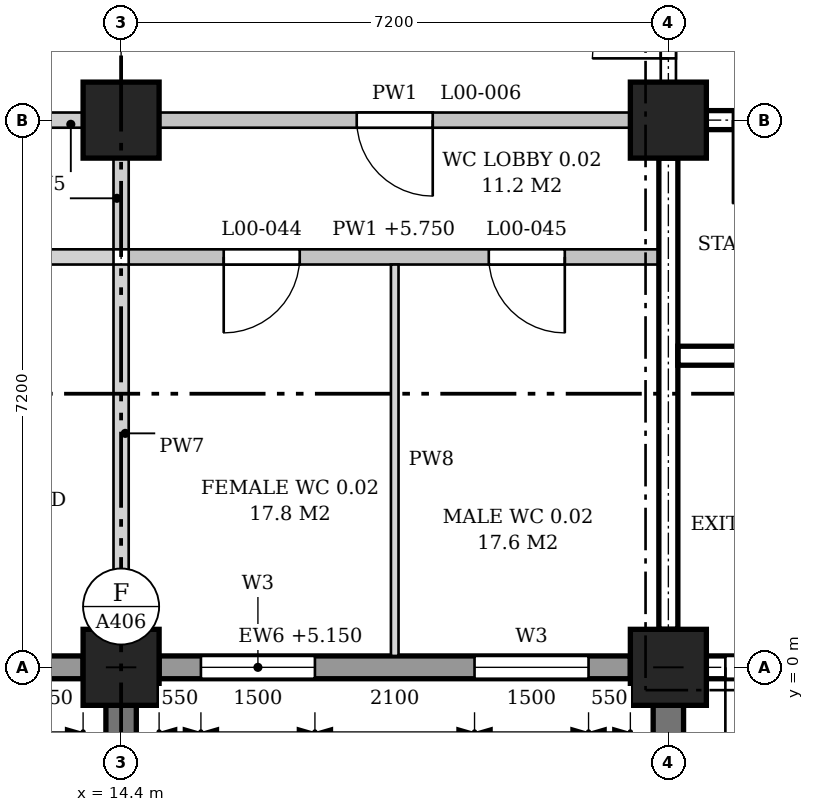
"""IFC4 building model, lengths in metres.
Left out: names, types, materials, properties, quantities, classifications, styles, units other than length and angle.
Written with IfcOpenShell. Run it as: python <this file> out.ifc"""

import sys

from ifc_helpers import new_model, si_unit, direction, frame, frame_2d, origin, origin_2d, place, context, subcontext, project, spatial, polyline, rectangle, outline, extrude, element, fill, save


model = new_model("IFC4")
c1 = context("Model", 3, precision=1e-05, world=origin(), true_north=direction((0.0, 1.0)))
c2 = subcontext(c1, "Body", "Model", "MODEL_VIEW")
j1 = project(units=[si_unit("LENGTHUNIT", "METRE"), si_unit("PLANEANGLEUNIT", "RADIAN")], contexts=[c1])
p1 = place(None, origin())
s1 = spatial("IfcSite", under=j1, at=p1, CompositionType="ELEMENT")
p2 = place(p1, origin())
s2 = spatial("IfcBuilding", under=s1, at=p2, CompositionType="ELEMENT")
p3 = place(p2, origin())
s3 = spatial("IfcBuildingStorey", under=s2, at=p3, CompositionType="ELEMENT", Elevation=0.0)
for number, where, z_axis, x_axis in (
    (1, (14.4, 0.0, 0.0), (0.0, 0.0, 1.0), (1.0, 0.0, 0.0)),
    (2, (14.4, 7.2, 0.0), (0.0, 0.0, 1.0), (1.0, 0.0, 0.0)),
    (3, (21.6, 0.0, 0.0), (0.0, 0.0, 1.0), (1.0, 0.0, 0.0)),
    (4, (21.6, 7.2, 0.0), (0.0, 0.0, 1.0), (1.0, 0.0, 0.0)),
):
    element("IfcColumn", number, at=place(p3, frame(where, z_axis=z_axis, x_axis=x_axis)), inside=s3, PredefinedType="COLUMN", context=c2, shape_type="SweptSolid", body=[
        extrude(rectangle(XDim=1.0, YDim=1.0, at=origin_2d()), origin(), (0.0, 0.0, 1.0), 6.0),
    ])
p4 = place(p3, frame((7.7, 0.0, 0.0), z_axis=(0.0, 0.0, 1.0), x_axis=(1.0, 0.0, 0.0)))
e5 = element("IfcWall", 5, at=p4, inside=s3, PredefinedType="STANDARD", context=c2, shape_type="SweptSolid", body=[
    extrude(rectangle(XDim=6.2, YDim=0.3, at=frame_2d((3.1, 0.0))), origin(), (0.0, 0.0, 1.0), 5.15),
])
p5 = place(p4, frame((4.35, 0.0, 0.0)))
e6 = element("IfcOpeningElement", 6, at=p5, cuts=e5, PredefinedType="OPENING", context=c2, shape_type="SweptSolid", body=[
    extrude(rectangle(XDim=1.1, YDim=2.1, at=frame_2d((0.55, 1.05))), frame((0.0, 0.16, 0.0), z_axis=(0.0, -1.0, 0.0), x_axis=(1.0, 0.0, 0.0)), (0.0, 0.0, 1.0), 0.32),
])
p6 = place(p4, frame((0.55, 0.0, 0.9)))
e7 = element("IfcOpeningElement", 7, at=p6, cuts=e5, PredefinedType="OPENING", context=c2, shape_type="SweptSolid", body=[
    extrude(outline(polyline([(0.0, 0.0), (1.5, 0.0), (1.5, 3.25), (0.75, 4.0), (0.0, 3.25), (0.0, 0.0)])), frame((0.0, 0.16, 0.0), z_axis=(0.0, -1.0, 0.0), x_axis=(1.0, 0.0, 0.0)), (0.0, 0.0, 1.0), 0.32),
])
p7 = place(p3, frame((14.9, 0.0, 0.0), z_axis=(0.0, 0.0, 1.0), x_axis=(1.0, 0.0, 0.0)))
e8 = element("IfcWall", 8, at=p7, inside=s3, PredefinedType="STANDARD", context=c2, shape_type="SweptSolid", body=[
    extrude(rectangle(XDim=6.2, YDim=0.3, at=frame_2d((3.1, 0.0))), origin(), (0.0, 0.0, 1.0), 5.15),
])
p8 = place(p7, frame((0.55, 0.0, 0.9)))
e9 = element("IfcOpeningElement", 9, at=p8, cuts=e8, PredefinedType="OPENING", context=c2, shape_type="SweptSolid", body=[
    extrude(outline(polyline([(0.0, 0.0), (1.5, 0.0), (1.5, 3.25), (0.75, 4.0), (0.0, 3.25), (0.0, 0.0)])), frame((0.0, 0.16, 0.0), z_axis=(0.0, -1.0, 0.0), x_axis=(1.0, 0.0, 0.0)), (0.0, 0.0, 1.0), 0.32),
])
p9 = place(p7, frame((4.15, 0.0, 0.9)))
e10 = element("IfcOpeningElement", 10, at=p9, cuts=e8, PredefinedType="OPENING", context=c2, shape_type="SweptSolid", body=[
    extrude(outline(polyline([(0.0, 0.0), (1.5, 0.0), (1.5, 3.25), (0.75, 4.0), (0.0, 3.25), (0.0, 0.0)])), frame((0.0, 0.16, 0.0), z_axis=(0.0, -1.0, 0.0), x_axis=(1.0, 0.0, 0.0)), (0.0, 0.0, 1.0), 0.32),
])
p10 = place(p3, frame((22.1, 0.0, 0.0), z_axis=(0.0, 0.0, 1.0), x_axis=(1.0, 0.0, 0.0)))
e11 = element("IfcWall", 11, at=p10, inside=s3, PredefinedType="STANDARD", context=c2, shape_type="SweptSolid", body=[
    extrude(rectangle(XDim=6.2, YDim=0.3, at=frame_2d((3.1, 0.0))), origin(), (0.0, 0.0, 1.0), 5.15),
])
p11 = place(p10, frame((0.25, 0.0, 0.0)))
e12 = element("IfcOpeningElement", 12, at=p11, cuts=e11, PredefinedType="OPENING", context=c2, shape_type="SweptSolid", body=[
    extrude(rectangle(XDim=2.0, YDim=2.1, at=frame_2d((1.0, 1.05))), frame((0.0, 0.16, 0.0), z_axis=(0.0, -1.0, 0.0), x_axis=(1.0, 0.0, 0.0)), (0.0, 0.0, 1.0), 0.32),
])
p12 = place(p10, frame((4.45, 0.0, 0.9)))
e13 = element("IfcOpeningElement", 13, at=p12, cuts=e11, PredefinedType="OPENING", context=c2, shape_type="SweptSolid", body=[
    extrude(outline(polyline([(0.0, 0.0), (0.9, 0.0), (0.9, 3.55), (0.45, 4.0), (0.0, 3.55), (0.0, 0.0)])), frame((0.0, 0.16, 0.0), z_axis=(0.0, -1.0, 0.0), x_axis=(1.0, 0.0, 0.0)), (0.0, 0.0, 1.0), 0.32),
])
for number, where, z_axis, x_axis in (
    (14, (14.4, -0.5, 0.0), (0.0, 0.0, 1.0), (0.0, -1.0, 0.0)),
    (15, (21.6, -0.5, 0.0), (0.0, 0.0, 1.0), (0.0, -1.0, 0.0)),
):
    element("IfcWall", number, at=place(p3, frame(where, z_axis=z_axis, x_axis=x_axis)), inside=s3, PredefinedType="POLYGONAL", context=c2, shape_type="SweptSolid", body=[
        extrude(outline(polyline([(1.2, 0.0), (1.2, 20.825), (0.85, 21.35), (0.0, 21.35), (0.0, 0.0), (1.2, 0.0)])), frame((0.0, 0.2, 0.0), z_axis=(0.0, -1.0, 0.0), x_axis=(1.0, 0.0, 0.0)), (0.0, 0.0, 1.0), 0.4),
    ])
p13 = place(p3, frame((22.1, 7.2, 0.0), z_axis=(0.0, 0.0, 1.0), x_axis=(1.0, 0.0, 0.0)))
e16 = element("IfcWall", 16, at=p13, inside=s3, PredefinedType="SHEAR", context=c2, shape_type="SweptSolid", body=[
    extrude(rectangle(XDim=6.2, YDim=0.25, at=frame_2d((3.1, 0.0))), origin(), (0.0, 0.0, 1.0), 5.0),
])
p14 = place(p13, frame((0.35, 0.0, 0.0)))
e17 = element("IfcOpeningElement", 17, at=p14, cuts=e16, PredefinedType="OPENING", context=c2, shape_type="SweptSolid", body=[
    extrude(rectangle(XDim=1.1, YDim=2.1, at=frame_2d((0.55, 1.05))), frame((0.0, 0.135, 0.0), z_axis=(0.0, -1.0, 0.0), x_axis=(1.0, 0.0, 0.0)), (0.0, 0.0, 1.0), 0.27),
])
p15 = place(p3, frame((21.6, 0.5, 0.0), z_axis=(0.0, 0.0, 1.0), x_axis=(0.0, 1.0, 0.0)))
e18 = element("IfcWall", 18, at=p15, inside=s3, PredefinedType="SHEAR", context=c2, shape_type="SweptSolid", body=[
    extrude(rectangle(XDim=6.2, YDim=0.25, at=frame_2d((3.1, 0.0))), origin(), (0.0, 0.0, 1.0), 5.0),
])
p16 = place(p3, frame((21.725, 4.1, 0.0), z_axis=(0.0, 0.0, 1.0), x_axis=(1.0, 0.0, 0.0)))
e19 = element("IfcWall", 19, at=p16, inside=s3, PredefinedType="SHEAR", context=c2, shape_type="SweptSolid", body=[
    extrude(rectangle(XDim=2.975, YDim=0.25, at=frame_2d((1.487, 0.0))), origin(), (0.0, 0.0, 1.0), 5.75),
])
p17 = place(p16, frame((1.425, 0.0, 0.0)))
e20 = element("IfcOpeningElement", 20, at=p17, cuts=e19, PredefinedType="OPENING", context=c2, shape_type="SweptSolid", body=[
    extrude(rectangle(XDim=1.1, YDim=2.1, at=frame_2d((0.55, 1.05))), frame((0.0, 0.135, 0.0), z_axis=(0.0, -1.0, 0.0), x_axis=(1.0, 0.0, 0.0)), (0.0, 0.0, 1.0), 0.27),
])
p18 = place(p3, frame((10.9, 5.4, 0.0), z_axis=(0.0, 0.0, 1.0), x_axis=(1.0, 0.0, 0.0)))
e21 = element("IfcWall", 21, at=p18, inside=s3, PredefinedType="SOLIDWALL", context=c2, shape_type="SweptSolid", body=[
    extrude(outline(polyline([(0.0, 0.0), (3.4, 0.0), (3.4, 5.0), (3.25, 5.0), (3.25, 5.75), (0.0, 5.75), (0.0, 0.0)])), frame((0.0, 0.1, 0.0), z_axis=(0.0, -1.0, 0.0), x_axis=(1.0, 0.0, 0.0)), (0.0, 0.0, 1.0), 0.2),
])
p19 = place(p3, frame((14.5, 5.4, 0.0), z_axis=(0.0, 0.0, 1.0), x_axis=(1.0, 0.0, 0.0)))
e22 = element("IfcWall", 22, at=p19, inside=s3, PredefinedType="PARTITIONING", context=c2, shape_type="SweptSolid", body=[
    extrude(outline(polyline([(0.0, 0.0), (6.975, 0.0), (6.975, 5.0), (6.85, 5.0), (6.85, 5.75), (0.15, 5.75), (0.15, 5.0), (0.0, 5.0), (0.0, 0.0)])), frame((0.0, 0.1, 0.0), z_axis=(0.0, -1.0, 0.0), x_axis=(1.0, 0.0, 0.0)), (0.0, 0.0, 1.0), 0.2),
])
p20 = place(p19, frame((1.25, 0.0, 0.0)))
e23 = element("IfcOpeningElement", 23, at=p20, cuts=e22, PredefinedType="OPENING", context=c2, shape_type="SweptSolid", body=[
    extrude(rectangle(XDim=1.0, YDim=2.1, at=frame_2d((0.5, 1.05))), frame((0.0, 0.11, 0.0), z_axis=(0.0, -1.0, 0.0), x_axis=(1.0, 0.0, 0.0)), (0.0, 0.0, 1.0), 0.22),
])
p21 = place(p19, frame((4.738, 0.0, 0.0)))
e24 = element("IfcOpeningElement", 24, at=p21, cuts=e22, PredefinedType="OPENING", context=c2, shape_type="SweptSolid", body=[
    extrude(rectangle(XDim=1.0, YDim=2.1, at=frame_2d((0.5, 1.05))), frame((0.0, 0.11, 0.0), z_axis=(0.0, -1.0, 0.0), x_axis=(1.0, 0.0, 0.0)), (0.0, 0.0, 1.0), 0.22),
])
p22 = place(p3, frame((10.8, 7.2, 0.0), z_axis=(0.0, 0.0, 1.0), x_axis=(1.0, 0.0, 0.0)))
e25 = element("IfcWall", 25, at=p22, inside=s3, PredefinedType="SOLIDWALL", context=c2, shape_type="SweptSolid", body=[
    extrude(rectangle(XDim=3.1, YDim=0.2, at=frame_2d((1.55, 0.0))), origin(), (0.0, 0.0, 1.0), 5.0),
])
p23 = place(p22, frame((1.1, 0.0, 0.0)))
e26 = element("IfcOpeningElement", 26, at=p23, cuts=e25, PredefinedType="OPENING", context=c2, shape_type="SweptSolid", body=[
    extrude(rectangle(XDim=0.9, YDim=2.1, at=frame_2d((0.45, 1.05))), frame((0.0, 0.11, 0.0), z_axis=(0.0, -1.0, 0.0), x_axis=(1.0, 0.0, 0.0)), (0.0, 0.0, 1.0), 0.22),
])
p24 = place(p3, frame((14.9, 7.2, 0.0), z_axis=(0.0, 0.0, 1.0), x_axis=(1.0, 0.0, 0.0)))
e27 = element("IfcWall", 27, at=p24, inside=s3, PredefinedType="PARTITIONING", context=c2, shape_type="SweptSolid", body=[
    extrude(rectangle(XDim=6.2, YDim=0.2, at=frame_2d((3.1, 0.0))), origin(), (0.0, 0.0, 1.0), 5.0),
])
p25 = place(p24, frame((2.6, 0.0, 0.0)))
e28 = element("IfcOpeningElement", 28, at=p25, cuts=e27, PredefinedType="OPENING", context=c2, shape_type="SweptSolid", body=[
    extrude(rectangle(XDim=1.0, YDim=2.1, at=frame_2d((0.5, 1.05))), frame((0.0, 0.11, 0.0), z_axis=(0.0, -1.0, 0.0), x_axis=(1.0, 0.0, 0.0)), (0.0, 0.0, 1.0), 0.22),
])
p26 = place(p3, frame((14.4, 0.5, 0.0), z_axis=(0.0, 0.0, 1.0), x_axis=(0.0, 1.0, 0.0)))
e29 = element("IfcWall", 29, at=p26, inside=s3, PredefinedType="SOLIDWALL", context=c2, shape_type="SweptSolid", body=[
    extrude(rectangle(XDim=4.8, YDim=0.2, at=frame_2d((2.4, 0.0))), origin(), (0.0, 0.0, 1.0), 5.0),
])
p27 = place(p3, frame((14.4, 5.5, 0.0), z_axis=(0.0, 0.0, 1.0), x_axis=(0.0, 1.0, 0.0)))
e30 = element("IfcWall", 30, at=p27, inside=s3, PredefinedType="SOLIDWALL", context=c2, shape_type="SweptSolid", body=[
    extrude(rectangle(XDim=1.2, YDim=0.2, at=frame_2d((0.6, 0.0))), origin(), (0.0, 0.0, 1.0), 5.0),
])
p28 = place(p3, frame((18.0, 0.15, 0.0), z_axis=(0.0, 0.0, 1.0), x_axis=(0.0, 1.0, 0.0)))
e31 = element("IfcWall", 31, at=p28, inside=s3, PredefinedType="PARTITIONING", context=c2, shape_type="SweptSolid", body=[
    extrude(rectangle(XDim=5.15, YDim=0.1, at=frame_2d((2.575, 0.0))), origin(), (0.0, 0.0, 1.0), 5.0),
])
p29 = place(p3, frame((21.6, 7.7, 0.0), z_axis=(0.0, 0.0, 1.0), x_axis=(0.0, 1.0, 0.0)))
e32 = element("IfcWall", 32, at=p29, inside=s3, PredefinedType="PARTITIONING", context=c2, shape_type="SweptSolid", body=[
    extrude(rectangle(XDim=2.625, YDim=0.2, at=frame_2d((1.312, 0.0))), origin(), (0.0, 0.0, 1.0), 5.0),
])
p30 = place(p29, frame((0.312, 0.0, 0.0)))
e33 = element("IfcOpeningElement", 33, at=p30, cuts=e32, PredefinedType="OPENING", context=c2, shape_type="SweptSolid", body=[
    extrude(rectangle(XDim=2.0, YDim=2.4, at=frame_2d((1.0, 1.2))), frame((0.0, 0.11, 0.0), z_axis=(0.0, -1.0, 0.0), x_axis=(1.0, 0.0, 0.0)), (0.0, 0.0, 1.0), 0.22),
])
p31 = place(p11, frame((2.0, 0.0, 0.0), z_axis=(0.0, 0.0, 1.0), x_axis=(-1.0, 0.0, 0.0)))
e34 = element("IfcDoor", 34, at=p31, inside=s3, OperationType="DOUBLE_DOOR_SINGLE_SWING", PredefinedType="DOOR", context=c2, shape_type="SweptSolid", body=[
    extrude(rectangle(XDim=2.0, YDim=2.1, at=frame_2d((1.0, 1.05))), frame((0.0, 0.025, 0.0), z_axis=(0.0, -1.0, 0.0), x_axis=(1.0, 0.0, 0.0)), (0.0, 0.0, 1.0), 0.05),
])
fill(e12, e34)
p32 = place(p8, origin())
e35 = element("IfcWindow", 35, at=p32, inside=s3, PartitioningType="SINGLE_PANEL", PredefinedType="WINDOW", context=c2, shape_type="SweptSolid", body=[
    extrude(outline(polyline([(0.0, 0.0), (1.5, 0.0), (1.5, 3.25), (0.75, 4.0), (0.0, 3.25), (0.0, 0.0)])), frame((0.0, 0.03, 0.0), z_axis=(0.0, -1.0, 0.0), x_axis=(1.0, 0.0, 0.0)), (0.0, 0.0, 1.0), 0.06),
])
fill(e9, e35)
p33 = place(p9, origin())
e36 = element("IfcWindow", 36, at=p33, inside=s3, PartitioningType="SINGLE_PANEL", PredefinedType="WINDOW", context=c2, shape_type="SweptSolid", body=[
    extrude(outline(polyline([(0.0, 0.0), (1.5, 0.0), (1.5, 3.25), (0.75, 4.0), (0.0, 3.25), (0.0, 0.0)])), frame((0.0, 0.03, 0.0), z_axis=(0.0, -1.0, 0.0), x_axis=(1.0, 0.0, 0.0)), (0.0, 0.0, 1.0), 0.06),
])
fill(e10, e36)
p34 = place(p14, frame((1.1, 0.0, 0.0), z_axis=(0.0, 0.0, 1.0), x_axis=(-1.0, 0.0, 0.0)))
e37 = element("IfcDoor", 37, at=p34, inside=s3, OperationType="SINGLE_SWING_RIGHT", PredefinedType="DOOR", context=c2, shape_type="SweptSolid", body=[
    extrude(rectangle(XDim=1.1, YDim=2.1, at=frame_2d((0.55, 1.05))), frame((0.0, 0.025, 0.0), z_axis=(0.0, -1.0, 0.0), x_axis=(1.0, 0.0, 0.0)), (0.0, 0.0, 1.0), 0.05),
])
fill(e17, e37)
p35 = place(p30, origin())
e38 = element("IfcDoor", 38, at=p35, inside=s3, OperationType="DOUBLE_DOOR_SINGLE_SWING", PredefinedType="DOOR", context=c2, shape_type="SweptSolid", body=[
    extrude(rectangle(XDim=2.0, YDim=2.4, at=frame_2d((1.0, 1.2))), frame((0.0, 0.025, 0.0), z_axis=(0.0, -1.0, 0.0), x_axis=(1.0, 0.0, 0.0)), (0.0, 0.0, 1.0), 0.05),
])
fill(e33, e38)
p36 = place(p25, frame((1.0, 0.0, 0.0), z_axis=(0.0, 0.0, 1.0), x_axis=(-1.0, 0.0, 0.0)))
e39 = element("IfcDoor", 39, at=p36, inside=s3, OperationType="SINGLE_SWING_LEFT", PredefinedType="DOOR", context=c2, shape_type="SweptSolid", body=[
    extrude(rectangle(XDim=1.0, YDim=2.1, at=frame_2d((0.5, 1.05))), frame((0.0, 0.025, 0.0), z_axis=(0.0, -1.0, 0.0), x_axis=(1.0, 0.0, 0.0)), (0.0, 0.0, 1.0), 0.05),
])
fill(e28, e39)
p37 = place(p20, frame((1.0, 0.0, 0.0), z_axis=(0.0, 0.0, 1.0), x_axis=(-1.0, 0.0, 0.0)))
e40 = element("IfcDoor", 40, at=p37, inside=s3, OperationType="SINGLE_SWING_RIGHT", PredefinedType="DOOR", context=c2, shape_type="SweptSolid", body=[
    extrude(rectangle(XDim=1.0, YDim=2.1, at=frame_2d((0.5, 1.05))), frame((0.0, 0.025, 0.0), z_axis=(0.0, -1.0, 0.0), x_axis=(1.0, 0.0, 0.0)), (0.0, 0.0, 1.0), 0.05),
])
fill(e23, e40)
p38 = place(p21, frame((1.0, 0.0, 0.0), z_axis=(0.0, 0.0, 1.0), x_axis=(-1.0, 0.0, 0.0)))
e41 = element("IfcDoor", 41, at=p38, inside=s3, OperationType="SINGLE_SWING_LEFT", PredefinedType="DOOR", context=c2, shape_type="SweptSolid", body=[
    extrude(rectangle(XDim=1.0, YDim=2.1, at=frame_2d((0.5, 1.05))), frame((0.0, 0.025, 0.0), z_axis=(0.0, -1.0, 0.0), x_axis=(1.0, 0.0, 0.0)), (0.0, 0.0, 1.0), 0.05),
])
fill(e24, e41)
save(model, sys.argv[1])
